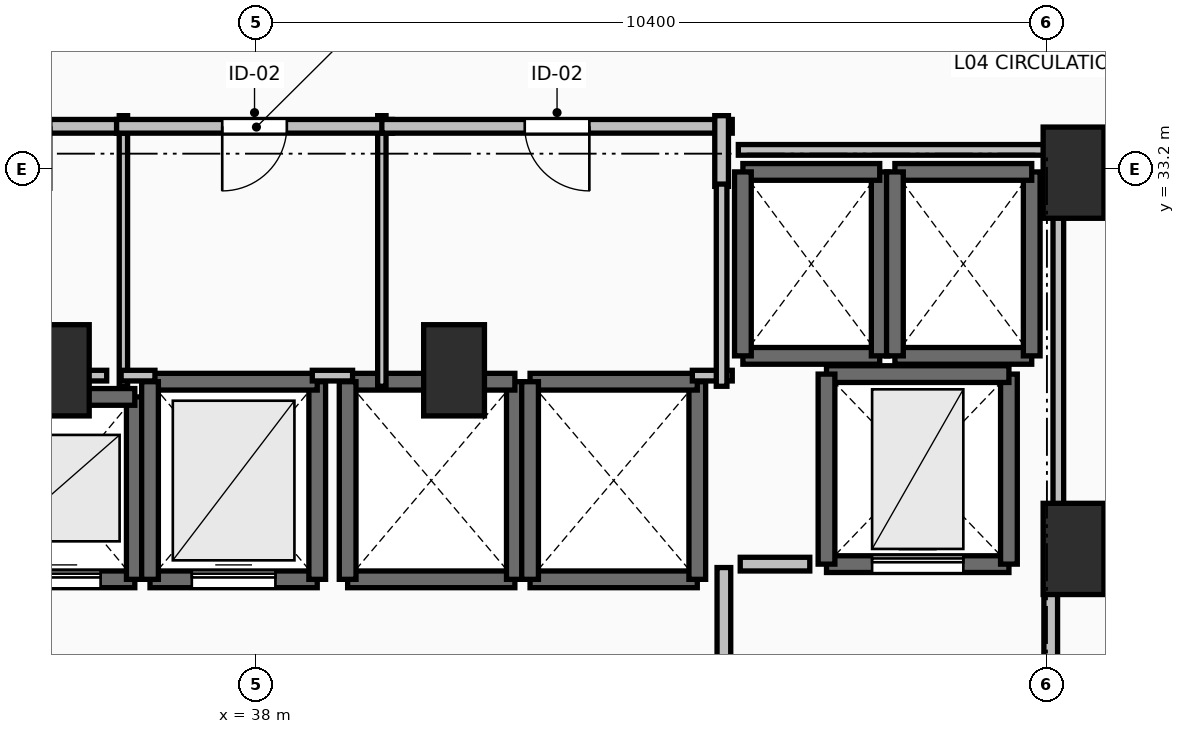
"""IFC4 building model, lengths in metres.
Left out: names, types, materials, properties, quantities, classifications, styles, units other than length and angle.
Written with IfcOpenShell. Run it as: python <this file> out.ifc"""

import sys

from ifc_helpers import new_model, si_unit, direction, frame, frame_2d, origin, origin_2d, place, context, subcontext, project, spatial, rectangle, extrude, element, fill, save


model = new_model("IFC4")
c1 = context("Model", 3, precision=1e-05, world=origin(), true_north=direction((0.0, 1.0)))
c2 = subcontext(c1, "Body", "Model", "MODEL_VIEW")
j1 = project(units=[si_unit("LENGTHUNIT", "METRE"), si_unit("PLANEANGLEUNIT", "RADIAN")], contexts=[c1])
p1 = place(None, origin())
s1 = spatial("IfcSite", under=j1, at=p1, CompositionType="ELEMENT")
p2 = place(p1, origin())
s2 = spatial("IfcBuilding", under=s1, at=p2, CompositionType="ELEMENT")
p3 = place(p2, frame((0.0, 0.0, 19.2)))
s3 = spatial("IfcBuildingStorey", under=s2, at=p3, CompositionType="ELEMENT", Elevation=19.2)
for number, where, z_axis, x_axis in (
    (1, (48.75, 33.15, 0.0), (0.0, 0.0, 1.0), (1.0, 0.0, 0.0)),
    (2, (48.75, 28.2, 0.0), (0.0, 0.0, 1.0), (1.0, 0.0, 0.0)),
    (3, (35.4, 30.55, 0.0), (0.0, 0.0, 1.0), (1.0, 0.0, 0.0)),
    (4, (40.6, 30.55, 0.0), (0.0, 0.0, 1.0), (1.0, 0.0, 0.0)),
):
    element("IfcColumn", number, at=place(p3, frame(where, z_axis=z_axis, x_axis=x_axis)), inside=s3, PredefinedType="PILASTER", context=c2, shape_type="SweptSolid", body=[
        extrude(rectangle(XDim=0.8, YDim=1.2, at=origin_2d()), origin(), (0.0, 0.0, 1.0), 4.8),
    ])
p4 = place(p3, frame((34.4, 27.8, 0.0), z_axis=(0.0, 0.0, 1.0), x_axis=(1.0, 0.0, 0.0)))
e5 = element("IfcWall", 5, at=p4, inside=s3, PredefinedType="SOLIDWALL", context=c2, shape_type="SweptSolid", body=[
    extrude(rectangle(XDim=2.0, YDim=0.22, at=frame_2d((1.0, 0.0))), origin(), (0.0, 0.0, 1.0), 4.54),
])
p5 = place(p4, frame((0.45, 0.0, 0.0)))
e6 = element("IfcOpeningElement", 6, at=p5, cuts=e5, PredefinedType="OPENING", context=c2, shape_type="SweptSolid", body=[
    extrude(rectangle(XDim=1.1, YDim=2.2, at=frame_2d((0.55, 1.1))), frame((0.0, 0.125, 0.0), z_axis=(0.0, -1.0, 0.0), x_axis=(1.0, 0.0, 0.0)), (0.0, 0.0, 1.0), 0.25),
])
p6 = place(p3, frame((36.4, 27.8, 0.0), z_axis=(0.0, 0.0, 1.0), x_axis=(0.0, 1.0, 0.0)))
e7 = element("IfcWall", 7, at=p6, inside=s3, PredefinedType="SOLIDWALL", context=c2, shape_type="SweptSolid", body=[
    extrude(rectangle(XDim=2.4, YDim=0.22, at=frame_2d((1.2, 0.0))), origin(), (0.0, 0.0, 1.0), 4.54),
])
p7 = place(p3, frame((36.4, 30.2, 0.0), z_axis=(0.0, 0.0, 1.0), x_axis=(-1.0, 0.0, 0.0)))
e8 = element("IfcWall", 8, at=p7, inside=s3, PredefinedType="SOLIDWALL", context=c2, shape_type="SweptSolid", body=[
    extrude(rectangle(XDim=2.0, YDim=0.22, at=frame_2d((1.0, 0.0))), origin(), (0.0, 0.0, 1.0), 4.54),
])
p8 = place(p3, frame((36.6, 27.8, 0.0), z_axis=(0.0, 0.0, 1.0), x_axis=(1.0, 0.0, 0.0)))
e9 = element("IfcWall", 9, at=p8, inside=s3, PredefinedType="SOLIDWALL", context=c2, shape_type="SweptSolid", body=[
    extrude(rectangle(XDim=2.2, YDim=0.22, at=frame_2d((1.1, 0.0))), origin(), (0.0, 0.0, 1.0), 4.54),
])
p9 = place(p8, frame((0.55, 0.0, 0.0)))
e10 = element("IfcOpeningElement", 10, at=p9, cuts=e9, PredefinedType="OPENING", context=c2, shape_type="SweptSolid", body=[
    extrude(rectangle(XDim=1.1, YDim=2.2, at=frame_2d((0.55, 1.1))), frame((0.0, 0.125, 0.0), z_axis=(0.0, -1.0, 0.0), x_axis=(1.0, 0.0, 0.0)), (0.0, 0.0, 1.0), 0.25),
])
p10 = place(p3, frame((38.8, 27.8, 0.0), z_axis=(0.0, 0.0, 1.0), x_axis=(0.0, 1.0, 0.0)))
e11 = element("IfcWall", 11, at=p10, inside=s3, PredefinedType="SOLIDWALL", context=c2, shape_type="SweptSolid", body=[
    extrude(rectangle(XDim=2.6, YDim=0.22, at=frame_2d((1.3, 0.0))), origin(), (0.0, 0.0, 1.0), 4.54),
])
p11 = place(p3, frame((38.8, 30.4, 0.0), z_axis=(0.0, 0.0, 1.0), x_axis=(-1.0, 0.0, 0.0)))
e12 = element("IfcWall", 12, at=p11, inside=s3, PredefinedType="SOLIDWALL", context=c2, shape_type="SweptSolid", body=[
    extrude(rectangle(XDim=2.2, YDim=0.22, at=frame_2d((1.1, 0.0))), origin(), (0.0, 0.0, 1.0), 4.54),
])
p12 = place(p3, frame((36.6, 30.4, 0.0), z_axis=(0.0, 0.0, 1.0), x_axis=(0.0, -1.0, 0.0)))
e13 = element("IfcWall", 13, at=p12, inside=s3, PredefinedType="SOLIDWALL", context=c2, shape_type="SweptSolid", body=[
    extrude(rectangle(XDim=2.6, YDim=0.22, at=frame_2d((1.3, 0.0))), origin(), (0.0, 0.0, 1.0), 4.54),
])
p13 = place(p3, frame((39.2, 27.8, 0.0), z_axis=(0.0, 0.0, 1.0), x_axis=(1.0, 0.0, 0.0)))
e14 = element("IfcWall", 14, at=p13, inside=s3, PredefinedType="SOLIDWALL", context=c2, shape_type="SweptSolid", body=[
    extrude(rectangle(XDim=2.2, YDim=0.22, at=frame_2d((1.1, 0.0))), origin(), (0.0, 0.0, 1.0), 4.54),
])
p14 = place(p3, frame((41.4, 27.8, 0.0), z_axis=(0.0, 0.0, 1.0), x_axis=(0.0, 1.0, 0.0)))
e15 = element("IfcWall", 15, at=p14, inside=s3, PredefinedType="SOLIDWALL", context=c2, shape_type="SweptSolid", body=[
    extrude(rectangle(XDim=2.6, YDim=0.22, at=frame_2d((1.3, 0.0))), origin(), (0.0, 0.0, 1.0), 4.54),
])
p15 = place(p3, frame((41.4, 30.4, 0.0), z_axis=(0.0, 0.0, 1.0), x_axis=(-1.0, 0.0, 0.0)))
e16 = element("IfcWall", 16, at=p15, inside=s3, PredefinedType="SOLIDWALL", context=c2, shape_type="SweptSolid", body=[
    extrude(rectangle(XDim=2.2, YDim=0.22, at=frame_2d((1.1, 0.0))), origin(), (0.0, 0.0, 1.0), 4.54),
])
p16 = place(p3, frame((39.2, 30.4, 0.0), z_axis=(0.0, 0.0, 1.0), x_axis=(0.0, -1.0, 0.0)))
e17 = element("IfcWall", 17, at=p16, inside=s3, PredefinedType="SOLIDWALL", context=c2, shape_type="SweptSolid", body=[
    extrude(rectangle(XDim=2.6, YDim=0.22, at=frame_2d((1.3, 0.0))), origin(), (0.0, 0.0, 1.0), 4.54),
])
p17 = place(p3, frame((41.6, 27.8, 0.0), z_axis=(0.0, 0.0, 1.0), x_axis=(1.0, 0.0, 0.0)))
e18 = element("IfcWall", 18, at=p17, inside=s3, PredefinedType="SOLIDWALL", context=c2, shape_type="SweptSolid", body=[
    extrude(rectangle(XDim=2.2, YDim=0.22, at=frame_2d((1.1, 0.0))), origin(), (0.0, 0.0, 1.0), 4.54),
])
p18 = place(p3, frame((43.8, 27.8, 0.0), z_axis=(0.0, 0.0, 1.0), x_axis=(0.0, 1.0, 0.0)))
e19 = element("IfcWall", 19, at=p18, inside=s3, PredefinedType="SOLIDWALL", context=c2, shape_type="SweptSolid", body=[
    extrude(rectangle(XDim=2.6, YDim=0.22, at=frame_2d((1.3, 0.0))), origin(), (0.0, 0.0, 1.0), 4.54),
])
p19 = place(p3, frame((43.8, 30.4, 0.0), z_axis=(0.0, 0.0, 1.0), x_axis=(-1.0, 0.0, 0.0)))
e20 = element("IfcWall", 20, at=p19, inside=s3, PredefinedType="SOLIDWALL", context=c2, shape_type="SweptSolid", body=[
    extrude(rectangle(XDim=2.2, YDim=0.22, at=frame_2d((1.1, 0.0))), origin(), (0.0, 0.0, 1.0), 4.54),
])
p20 = place(p3, frame((41.6, 30.4, 0.0), z_axis=(0.0, 0.0, 1.0), x_axis=(0.0, -1.0, 0.0)))
e21 = element("IfcWall", 21, at=p20, inside=s3, PredefinedType="SOLIDWALL", context=c2, shape_type="SweptSolid", body=[
    extrude(rectangle(XDim=2.6, YDim=0.22, at=frame_2d((1.3, 0.0))), origin(), (0.0, 0.0, 1.0), 4.54),
])
p21 = place(p3, frame((44.4, 30.74, 0.0), z_axis=(0.0, 0.0, 1.0), x_axis=(1.0, 0.0, 0.0)))
e22 = element("IfcWall", 22, at=p21, inside=s3, PredefinedType="SOLIDWALL", context=c2, shape_type="SweptSolid", body=[
    extrude(rectangle(XDim=1.8, YDim=0.22, at=frame_2d((0.9, 0.0))), origin(), (0.0, 0.0, 1.0), 4.54),
])
p22 = place(p3, frame((46.2, 30.74, 0.0), z_axis=(0.0, 0.0, 1.0), x_axis=(0.0, 1.0, 0.0)))
e23 = element("IfcWall", 23, at=p22, inside=s3, PredefinedType="SOLIDWALL", context=c2, shape_type="SweptSolid", body=[
    extrude(rectangle(XDim=2.42, YDim=0.22, at=frame_2d((1.21, 0.0))), origin(), (0.0, 0.0, 1.0), 4.54),
])
p23 = place(p3, frame((46.2, 33.16, 0.0), z_axis=(0.0, 0.0, 1.0), x_axis=(-1.0, 0.0, 0.0)))
e24 = element("IfcWall", 24, at=p23, inside=s3, PredefinedType="SOLIDWALL", context=c2, shape_type="SweptSolid", body=[
    extrude(rectangle(XDim=1.8, YDim=0.22, at=frame_2d((0.9, 0.0))), origin(), (0.0, 0.0, 1.0), 4.54),
])
p24 = place(p3, frame((44.4, 33.16, 0.0), z_axis=(0.0, 0.0, 1.0), x_axis=(0.0, -1.0, 0.0)))
e25 = element("IfcWall", 25, at=p24, inside=s3, PredefinedType="SOLIDWALL", context=c2, shape_type="SweptSolid", body=[
    extrude(rectangle(XDim=2.42, YDim=0.22, at=frame_2d((1.21, 0.0))), origin(), (0.0, 0.0, 1.0), 4.54),
])
p25 = place(p3, frame((46.4, 30.74, 0.0), z_axis=(0.0, 0.0, 1.0), x_axis=(1.0, 0.0, 0.0)))
e26 = element("IfcWall", 26, at=p25, inside=s3, PredefinedType="SOLIDWALL", context=c2, shape_type="SweptSolid", body=[
    extrude(rectangle(XDim=1.8, YDim=0.22, at=frame_2d((0.9, 0.0))), origin(), (0.0, 0.0, 1.0), 4.54),
])
p26 = place(p3, frame((48.2, 30.74, 0.0), z_axis=(0.0, 0.0, 1.0), x_axis=(0.0, 1.0, 0.0)))
e27 = element("IfcWall", 27, at=p26, inside=s3, PredefinedType="SOLIDWALL", context=c2, shape_type="SweptSolid", body=[
    extrude(rectangle(XDim=2.42, YDim=0.22, at=frame_2d((1.21, 0.0))), origin(), (0.0, 0.0, 1.0), 4.54),
])
p27 = place(p3, frame((48.2, 33.16, 0.0), z_axis=(0.0, 0.0, 1.0), x_axis=(-1.0, 0.0, 0.0)))
e28 = element("IfcWall", 28, at=p27, inside=s3, PredefinedType="SOLIDWALL", context=c2, shape_type="SweptSolid", body=[
    extrude(rectangle(XDim=1.8, YDim=0.22, at=frame_2d((0.9, 0.0))), origin(), (0.0, 0.0, 1.0), 4.54),
])
p28 = place(p3, frame((46.4, 33.16, 0.0), z_axis=(0.0, 0.0, 1.0), x_axis=(0.0, -1.0, 0.0)))
e29 = element("IfcWall", 29, at=p28, inside=s3, PredefinedType="SOLIDWALL", context=c2, shape_type="SweptSolid", body=[
    extrude(rectangle(XDim=2.42, YDim=0.22, at=frame_2d((1.21, 0.0))), origin(), (0.0, 0.0, 1.0), 4.54),
])
p29 = place(p3, frame((45.5, 28.0, 0.0), z_axis=(0.0, 0.0, 1.0), x_axis=(1.0, 0.0, 0.0)))
e30 = element("IfcWall", 30, at=p29, inside=s3, PredefinedType="SHEAR", context=c2, shape_type="SweptSolid", body=[
    extrude(rectangle(XDim=2.4, YDim=0.22, at=frame_2d((1.2, 0.0))), origin(), (0.0, 0.0, 1.0), 4.54),
])
p30 = place(p29, frame((0.6, 0.0, 0.0)))
e31 = element("IfcOpeningElement", 31, at=p30, cuts=e30, PredefinedType="OPENING", context=c2, shape_type="SweptSolid", body=[
    extrude(rectangle(XDim=1.2, YDim=2.2, at=frame_2d((0.6, 1.1))), frame((0.0, 0.125, 0.0), z_axis=(0.0, -1.0, 0.0), x_axis=(1.0, 0.0, 0.0)), (0.0, 0.0, 1.0), 0.25),
])
p31 = place(p3, frame((47.9, 28.0, 0.0), z_axis=(0.0, 0.0, 1.0), x_axis=(0.0, 1.0, 0.0)))
e32 = element("IfcWall", 32, at=p31, inside=s3, PredefinedType="SHEAR", context=c2, shape_type="SweptSolid", body=[
    extrude(rectangle(XDim=2.5, YDim=0.22, at=frame_2d((1.25, 0.0))), origin(), (0.0, 0.0, 1.0), 4.54),
])
p32 = place(p3, frame((47.9, 30.5, 0.0), z_axis=(0.0, 0.0, 1.0), x_axis=(-1.0, 0.0, 0.0)))
e33 = element("IfcWall", 33, at=p32, inside=s3, PredefinedType="SHEAR", context=c2, shape_type="SweptSolid", body=[
    extrude(rectangle(XDim=2.4, YDim=0.22, at=frame_2d((1.2, 0.0))), origin(), (0.0, 0.0, 1.0), 4.54),
])
p33 = place(p3, frame((45.5, 30.5, 0.0), z_axis=(0.0, 0.0, 1.0), x_axis=(0.0, -1.0, 0.0)))
e34 = element("IfcWall", 34, at=p33, inside=s3, PredefinedType="SHEAR", context=c2, shape_type="SweptSolid", body=[
    extrude(rectangle(XDim=2.5, YDim=0.22, at=frame_2d((1.25, 0.0))), origin(), (0.0, 0.0, 1.0), 4.54),
])
p34 = place(p3, frame((44.15, 27.955, 0.0), z_axis=(0.0, 0.0, 1.0), x_axis=(0.0, -1.0, 0.0)))
e35 = element("IfcWall", 35, at=p34, inside=s3, PredefinedType="PARTITIONING", context=c2, shape_type="SweptSolid", body=[
    extrude(rectangle(XDim=3.91, YDim=0.18, at=frame_2d((1.955, 0.0))), origin(), (0.0, 0.0, 1.0), 4.54),
])
p35 = place(p34, frame((1.355, 0.0, 0.0)))
e36 = element("IfcOpeningElement", 36, at=p35, cuts=e35, PredefinedType="OPENING", context=c2, shape_type="SweptSolid", body=[
    extrude(rectangle(XDim=1.2, YDim=2.15, at=frame_2d((0.6, 1.075))), frame((0.0, 0.105, 0.0), z_axis=(0.0, -1.0, 0.0), x_axis=(1.0, 0.0, 0.0)), (0.0, 0.0, 1.0), 0.21),
])
p36 = place(p3, frame((48.45, 23.95, 0.0), z_axis=(0.0, 0.0, 1.0), x_axis=(0.0, 1.0, 0.0)))
e37 = element("IfcWall", 37, at=p36, inside=s3, PredefinedType="PARTITIONING", context=c2, shape_type="SweptSolid", body=[
    extrude(rectangle(XDim=4.05, YDim=0.18, at=frame_2d((2.025, 0.0))), origin(), (0.0, 0.0, 1.0), 4.54),
])
p37 = place(p36, frame((1.425, 0.0, 0.0)))
e38 = element("IfcOpeningElement", 38, at=p37, cuts=e37, PredefinedType="OPENING", context=c2, shape_type="SweptSolid", body=[
    extrude(rectangle(XDim=1.2, YDim=2.15, at=frame_2d((0.6, 1.075))), frame((0.0, 0.105, 0.0), z_axis=(0.0, -1.0, 0.0), x_axis=(1.0, 0.0, 0.0)), (0.0, 0.0, 1.0), 0.21),
])
p38 = place(p3, frame((36.25, 30.34, 0.0), z_axis=(0.0, 0.0, 1.0), x_axis=(0.0, 1.0, 0.0)))
e39 = element("IfcWall", 39, at=p38, inside=s3, PredefinedType="PARTITIONING", context=c2, shape_type="SweptSolid", body=[
    extrude(rectangle(XDim=3.56, YDim=0.11, at=frame_2d((1.78, 0.0))), origin(), (0.0, 0.0, 1.0), 3.732),
])
p39 = place(p3, frame((36.25, 33.76, 0.0), z_axis=(0.0, 0.0, 1.0), x_axis=(-1.0, 0.0, 0.0)))
e40 = element("IfcWall", 40, at=p39, inside=s3, PredefinedType="PARTITIONING", context=c2, shape_type="SweptSolid", body=[
    extrude(rectangle(XDim=2.75, YDim=0.18, at=frame_2d((1.375, 0.0))), origin(), (0.0, 0.0, 1.0), 4.54),
])
p40 = place(p39, frame((0.95, 0.0, 0.0)))
e41 = element("IfcOpeningElement", 41, at=p40, cuts=e40, PredefinedType="OPENING", context=c2, shape_type="SweptSolid", body=[
    extrude(rectangle(XDim=0.85, YDim=2.1, at=frame_2d((0.425, 1.05))), frame((0.0, 0.105, 0.0), z_axis=(0.0, -1.0, 0.0), x_axis=(1.0, 0.0, 0.0)), (0.0, 0.0, 1.0), 0.21),
])
p41 = place(p3, frame((39.65, 30.34, 0.0), z_axis=(0.0, 0.0, 1.0), x_axis=(0.0, 1.0, 0.0)))
e42 = element("IfcWall", 42, at=p41, inside=s3, PredefinedType="PARTITIONING", context=c2, shape_type="SweptSolid", body=[
    extrude(rectangle(XDim=3.56, YDim=0.11, at=frame_2d((1.78, 0.0))), origin(), (0.0, 0.0, 1.0), 3.732),
])
p42 = place(p3, frame((39.79, 33.76, 0.0), z_axis=(0.0, 0.0, 1.0), x_axis=(-1.0, 0.0, 0.0)))
e43 = element("IfcWall", 43, at=p42, inside=s3, PredefinedType="PARTITIONING", context=c2, shape_type="SweptSolid", body=[
    extrude(rectangle(XDim=3.63, YDim=0.18, at=frame_2d((1.815, 0.0))), origin(), (0.0, 0.0, 1.0), 4.54),
])
p43 = place(p42, frame((1.39, 0.0, 0.0)))
e44 = element("IfcOpeningElement", 44, at=p43, cuts=e43, PredefinedType="OPENING", context=c2, shape_type="SweptSolid", body=[
    extrude(rectangle(XDim=0.85, YDim=2.1, at=frame_2d((0.425, 1.05))), frame((0.0, 0.105, 0.0), z_axis=(0.0, -1.0, 0.0), x_axis=(1.0, 0.0, 0.0)), (0.0, 0.0, 1.0), 0.21),
])
p44 = place(p3, frame((44.26, 33.76, 0.0), z_axis=(0.0, 0.0, 1.0), x_axis=(-1.0, 0.0, 0.0)))
e45 = element("IfcWall", 45, at=p44, inside=s3, PredefinedType="PARTITIONING", context=c2, shape_type="SweptSolid", body=[
    extrude(rectangle(XDim=4.61, YDim=0.18, at=frame_2d((2.305, 0.0))), origin(), (0.0, 0.0, 1.0), 4.54),
])
p45 = place(p44, frame((1.88, 0.0, 0.0)))
e46 = element("IfcOpeningElement", 46, at=p45, cuts=e45, PredefinedType="OPENING", context=c2, shape_type="SweptSolid", body=[
    extrude(rectangle(XDim=0.85, YDim=2.1, at=frame_2d((0.425, 1.05))), frame((0.0, 0.105, 0.0), z_axis=(0.0, -1.0, 0.0), x_axis=(1.0, 0.0, 0.0)), (0.0, 0.0, 1.0), 0.21),
])
p46 = place(p3, frame((44.12, 32.97, 0.0), z_axis=(0.0, 0.0, 1.0), x_axis=(0.0, 1.0, 0.0)))
e47 = element("IfcWall", 47, at=p46, inside=s3, PredefinedType="PARTITIONING", context=c2, shape_type="SweptSolid", body=[
    extrude(rectangle(XDim=0.93, YDim=0.18, at=frame_2d((0.465, 0.0))), origin(), (0.0, 0.0, 1.0), 4.54),
])
p47 = place(p3, frame((45.28, 28.0, 0.0), z_axis=(0.0, 0.0, 1.0), x_axis=(-1.0, 0.0, 0.0)))
e48 = element("IfcWall", 48, at=p47, inside=s3, PredefinedType="PARTITIONING", context=c2, shape_type="SweptSolid", body=[
    extrude(rectangle(XDim=0.915, YDim=0.18, at=frame_2d((0.458, 0.0))), origin(), (0.0, 0.0, 1.0), 4.54),
])
p48 = place(p3, frame((33.7, 30.48, 0.0), z_axis=(0.0, 0.0, 1.0), x_axis=(1.0, 0.0, 0.0)))
e49 = element("IfcWall", 49, at=p48, inside=s3, PredefinedType="PARTITIONING", context=c2, shape_type="SweptSolid", body=[
    extrude(rectangle(XDim=2.33, YDim=0.14, at=frame_2d((1.165, 0.0))), origin(), (0.0, 0.0, 1.0), 3.732),
])
p49 = place(p3, frame((36.22, 30.48, 0.0), z_axis=(0.0, 0.0, 1.0), x_axis=(1.0, 0.0, 0.0)))
e50 = element("IfcWall", 50, at=p49, inside=s3, PredefinedType="PARTITIONING", context=c2, shape_type="SweptSolid", body=[
    extrude(rectangle(XDim=0.445, YDim=0.14, at=frame_2d((0.223, 0.0))), origin(), (0.0, 0.0, 1.0), 3.732),
])
p50 = place(p3, frame((38.735, 30.48, 0.0), z_axis=(0.0, 0.0, 1.0), x_axis=(1.0, 0.0, 0.0)))
e51 = element("IfcWall", 51, at=p50, inside=s3, PredefinedType="PARTITIONING", context=c2, shape_type="SweptSolid", body=[
    extrude(rectangle(XDim=0.53, YDim=0.14, at=frame_2d((0.265, 0.0))), origin(), (0.0, 0.0, 1.0), 3.732),
])
p51 = place(p3, frame((43.735, 30.48, 0.0), z_axis=(0.0, 0.0, 1.0), x_axis=(1.0, 0.0, 0.0)))
e52 = element("IfcWall", 52, at=p51, inside=s3, PredefinedType="PARTITIONING", context=c2, shape_type="SweptSolid", body=[
    extrude(rectangle(XDim=0.525, YDim=0.14, at=frame_2d((0.262, 0.0))), origin(), (0.0, 0.0, 1.0), 4.54),
])
p52 = place(p3, frame((44.12, 30.34, 0.0), z_axis=(0.0, 0.0, 1.0), x_axis=(0.0, 1.0, 0.0)))
e53 = element("IfcWall", 53, at=p52, inside=s3, PredefinedType="PARTITIONING", context=c2, shape_type="SweptSolid", body=[
    extrude(rectangle(XDim=2.66, YDim=0.14, at=frame_2d((1.33, 0.0))), origin(), (0.0, 0.0, 1.0), 4.54),
])
p53 = place(p3, frame((44.34, 33.45, 0.0), z_axis=(0.0, 0.0, 1.0), x_axis=(1.0, 0.0, 0.0)))
e54 = element("IfcWall", 54, at=p53, inside=s3, PredefinedType="PARTITIONING", context=c2, shape_type="SweptSolid", body=[
    extrude(rectangle(XDim=4.21, YDim=0.14, at=frame_2d((2.105, 0.0))), origin(), (0.0, 0.0, 1.0), 3.732),
])
p54 = place(p3, frame((48.55, 33.45, 0.0), z_axis=(0.0, 0.0, 1.0), x_axis=(0.0, -1.0, 0.0)))
e55 = element("IfcWall", 55, at=p54, inside=s3, PredefinedType="PARTITIONING", context=c2, shape_type="SweptSolid", body=[
    extrude(rectangle(XDim=5.254, YDim=0.14, at=frame_2d((2.627, 0.0))), origin(), (0.0, 0.0, 1.0), 3.732),
])
p55 = place(p5, origin())
e56 = element("IfcDoor", 56, at=p55, inside=s3, OperationType="SLIDING_TO_LEFT", PredefinedType="DOOR", context=c2, shape_type="SweptSolid", body=[
    extrude(rectangle(XDim=1.1, YDim=2.2, at=frame_2d((0.55, 1.1))), frame((0.0, 0.025, 0.0), z_axis=(0.0, -1.0, 0.0), x_axis=(1.0, 0.0, 0.0)), (0.0, 0.0, 1.0), 0.05),
])
fill(e6, e56)
p56 = place(p9, origin())
e57 = element("IfcDoor", 57, at=p56, inside=s3, OperationType="SLIDING_TO_LEFT", PredefinedType="DOOR", context=c2, shape_type="SweptSolid", body=[
    extrude(rectangle(XDim=1.1, YDim=2.2, at=frame_2d((0.55, 1.1))), frame((0.0, 0.025, 0.0), z_axis=(0.0, -1.0, 0.0), x_axis=(1.0, 0.0, 0.0)), (0.0, 0.0, 1.0), 0.05),
])
fill(e10, e57)
p57 = place(p30, origin())
e58 = element("IfcDoor", 58, at=p57, inside=s3, OperationType="SLIDING_TO_LEFT", PredefinedType="DOOR", context=c2, shape_type="SweptSolid", body=[
    extrude(rectangle(XDim=1.2, YDim=2.2, at=frame_2d((0.6, 1.1))), frame((0.0, 0.025, 0.0), z_axis=(0.0, -1.0, 0.0), x_axis=(1.0, 0.0, 0.0)), (0.0, 0.0, 1.0), 0.05),
])
fill(e31, e58)
p58 = place(p43, origin())
e59 = element("IfcDoor", 59, at=p58, inside=s3, OperationType="SINGLE_SWING_RIGHT", PredefinedType="DOOR", context=c2, shape_type="SweptSolid", body=[
    extrude(rectangle(XDim=0.85, YDim=2.1, at=frame_2d((0.425, 1.05))), frame((0.0, 0.025, 0.0), z_axis=(0.0, -1.0, 0.0), x_axis=(1.0, 0.0, 0.0)), (0.0, 0.0, 1.0), 0.05),
])
fill(e44, e59)
p59 = place(p45, origin())
e60 = element("IfcDoor", 60, at=p59, inside=s3, OperationType="SINGLE_SWING_LEFT", PredefinedType="DOOR", context=c2, shape_type="SweptSolid", body=[
    extrude(rectangle(XDim=0.85, YDim=2.1, at=frame_2d((0.425, 1.05))), frame((0.0, 0.025, 0.0), z_axis=(0.0, -1.0, 0.0), x_axis=(1.0, 0.0, 0.0)), (0.0, 0.0, 1.0), 0.05),
])
fill(e46, e60)
save(model, sys.argv[1])
